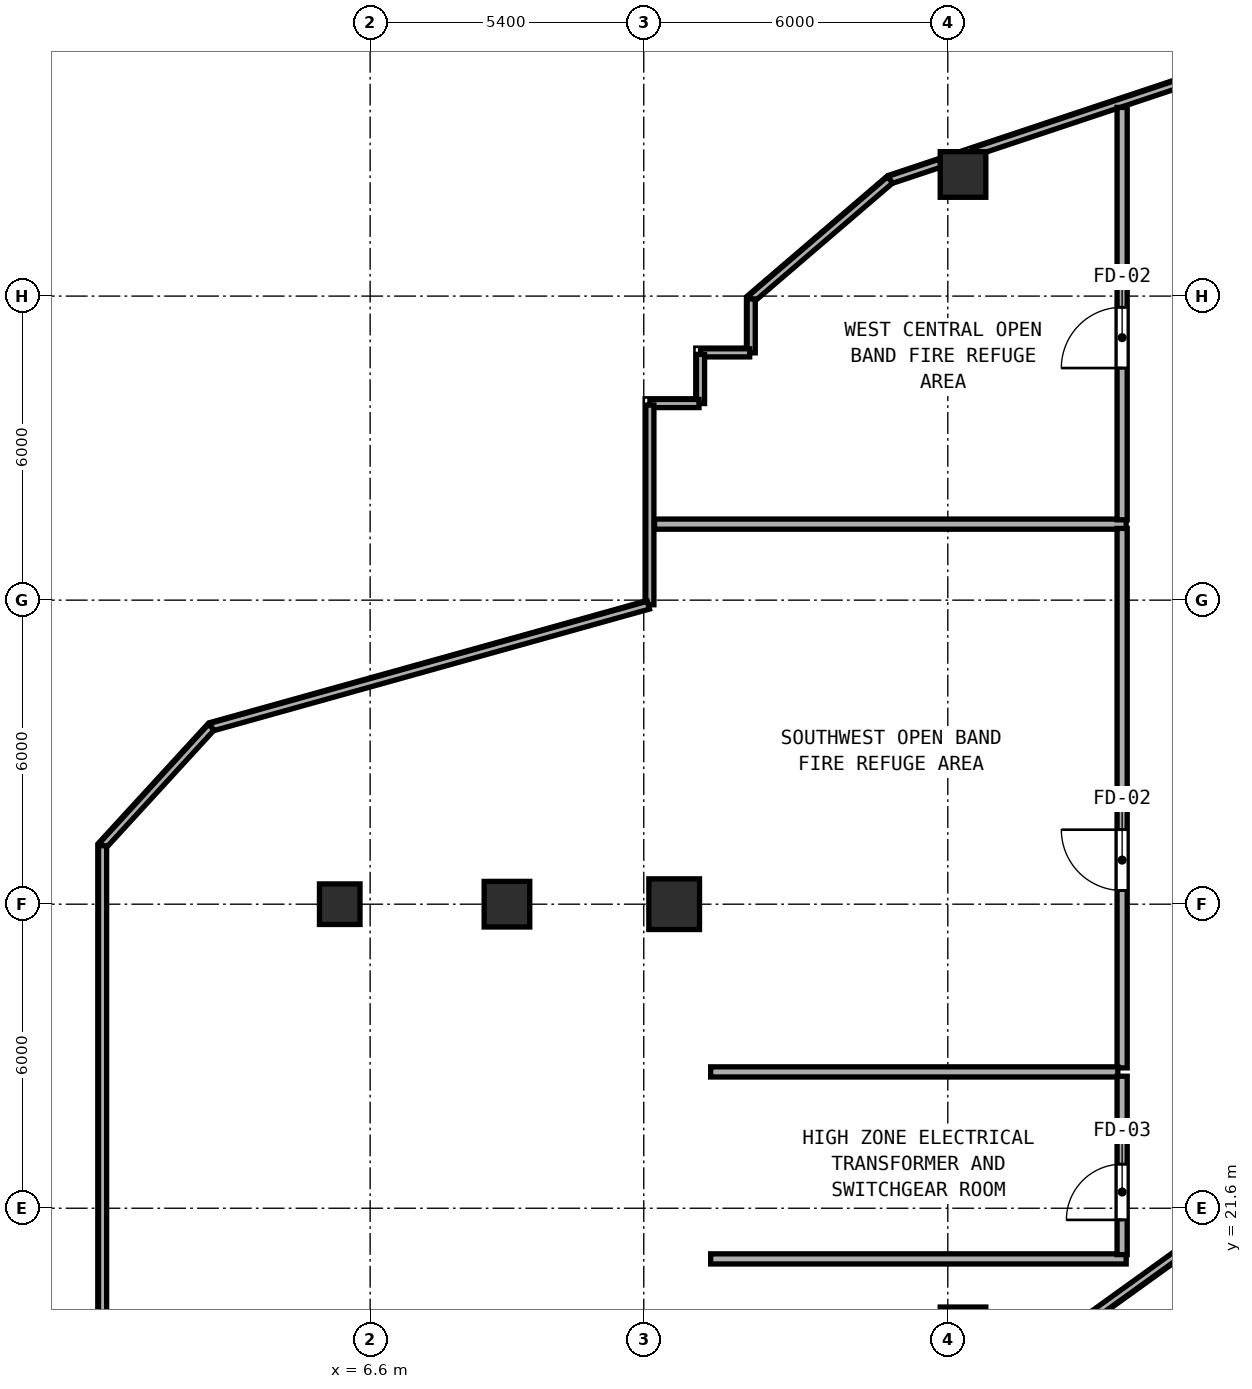
"""IFC4 building model, lengths in metres.
Left out: names, types, materials, properties, quantities, classifications, styles, units other than length and angle.
Written with IfcOpenShell. Run it as: python <this file> out.ifc"""

import sys

from ifc_helpers import new_model, si_unit, direction, frame, frame_2d, origin, origin_2d, place, context, subcontext, project, spatial, rectangle, hollow_rectangle, extrude, element, fill, save


model = new_model("IFC4")
c1 = context("Model", 3, precision=1e-05, world=origin(), true_north=direction((0.0, 1.0)))
c2 = subcontext(c1, "Body", "Model", "MODEL_VIEW")
j1 = project(units=[si_unit("LENGTHUNIT", "METRE"), si_unit("PLANEANGLEUNIT", "RADIAN")], contexts=[c1])
p1 = place(None, origin())
s1 = spatial("IfcSite", under=j1, at=p1, CompositionType="ELEMENT")
p2 = place(p1, origin())
s2 = spatial("IfcBuilding", under=s1, at=p2, CompositionType="ELEMENT")
p3 = place(p2, frame((0.0, 0.0, 160.0)))
s3 = spatial("IfcBuildingStorey", under=s2, at=p3, CompositionType="ELEMENT", Elevation=160.0)
p4 = place(p3, frame((12.6, 27.6, 0.0), z_axis=(0.0, 0.0, 1.0), x_axis=(1.0, 0.0, 0.0)))
e1 = element("IfcColumn", 1, at=p4, inside=s3, PredefinedType="COLUMN", context=c2, shape_type="SweptSolid", body=[
    extrude(hollow_rectangle(XDim=1.0, YDim=1.0, WallThickness=0.038, at=origin_2d()), origin(), (0.0, 0.0, 1.0), 4.6),
])
p5 = place(p3, frame((6.0, 27.6, 0.0), z_axis=(0.0, 0.0, 1.0), x_axis=(1.0, 0.0, 0.0)))
e2 = element("IfcColumn", 2, at=p5, inside=s3, PredefinedType="COLUMN", context=c2, shape_type="SweptSolid", body=[
    extrude(hollow_rectangle(XDim=0.8, YDim=0.8, WallThickness=0.03, at=origin_2d()), origin(), (0.0, 0.0, 1.0), 4.6),
])
for number, where, z_axis, x_axis in (
    (3, (18.3, 19.2, 0.0), (0.0, 0.0, 1.0), (1.0, 0.0, 0.0)),
    (4, (18.3, 42.0, 0.0), (0.0, 0.0, 1.0), (1.0, 0.0, 0.0)),
    (5, (9.3, 27.6, 0.0), (0.0, 0.0, 1.0), (1.0, 0.0, 0.0)),
):
    element("IfcColumn", number, at=place(p3, frame(where, z_axis=z_axis, x_axis=x_axis)), inside=s3, PredefinedType="COLUMN", context=c2, shape_type="SweptSolid", body=[
        extrude(hollow_rectangle(XDim=0.9, YDim=0.9, WallThickness=0.034, at=origin_2d()), origin(), (0.0, 0.0, 1.0), 4.6),
    ])
p6 = place(p3, frame((14.193, 14.687, 0.0), z_axis=(0.0, 0.0, 1.0), x_axis=(0.811543217016, 0.584292398475, 0.0)))
e6 = element("IfcWall", 6, at=p6, inside=s3, PredefinedType="PARAPET", context=c2, shape_type="SweptSolid", body=[
    extrude(rectangle(XDim=11.478, YDim=0.16, at=frame_2d((5.739, 0.0))), origin(), (0.0, 0.0, 1.0), 1.15),
])
p7 = place(p3, frame((24.092, 44.304, 0.0), z_axis=(0.0, 0.0, 1.0), x_axis=(-0.948683298051, -0.316227766017, 0.0)))
e7 = element("IfcWall", 7, at=p7, inside=s3, PredefinedType="PARAPET", context=c2, shape_type="SweptSolid", body=[
    extrude(rectangle(XDim=5.888, YDim=0.16, at=frame_2d((2.944, 0.0))), origin(), (0.0, 0.0, 1.0), 1.15),
])
p8 = place(p3, frame((17.858, 42.226, 0.0), z_axis=(0.0, 0.0, 1.0), x_axis=(-0.948636865667, -0.316367029093, 0.0)))
e8 = element("IfcWall", 8, at=p8, inside=s3, PredefinedType="PARAPET", context=c2, shape_type="SweptSolid", body=[
    extrude(rectangle(XDim=1.052, YDim=0.16, at=frame_2d((0.526, 0.0))), origin(), (0.0, 0.0, 1.0), 1.15),
])
p9 = place(p3, frame((16.86, 41.894, 0.0), z_axis=(0.0, 0.0, 1.0), x_axis=(-0.759247051556, -0.650802515902, 0.0)))
e9 = element("IfcWall", 9, at=p9, inside=s3, PredefinedType="PARAPET", context=c2, shape_type="SweptSolid", body=[
    extrude(rectangle(XDim=3.609, YDim=0.16, at=frame_2d((1.804, 0.0))), origin(), (0.0, 0.0, 1.0), 1.15),
])
p10 = place(p3, frame((14.12, 39.545, 0.0), z_axis=(0.0, 0.0, 1.0), x_axis=(0.0, -1.0, 0.0)))
e10 = element("IfcWall", 10, at=p10, inside=s3, PredefinedType="PARAPET", context=c2, shape_type="SweptSolid", body=[
    extrude(rectangle(XDim=1.065, YDim=0.16, at=frame_2d((0.532, 0.0))), origin(), (0.0, 0.0, 1.0), 1.15),
])
for number, where, z_axis, x_axis in (
    (11, (14.09, 38.48, 0.0), (0.0, 0.0, 1.0), (-1.0, 0.0, 0.0)),
    (12, (13.12, 38.45, 0.0), (0.0, 0.0, 1.0), (0.0, -1.0, 0.0)),
    (13, (13.09, 37.48, 0.0), (0.0, 0.0, 1.0), (-1.0, 0.0, 0.0)),
):
    element("IfcWall", number, at=place(p3, frame(where, z_axis=z_axis, x_axis=x_axis)), inside=s3, PredefinedType="PARAPET", context=c2, shape_type="SweptSolid", body=[
        extrude(rectangle(XDim=0.97, YDim=0.16, at=frame_2d((0.485, 0.0))), origin(), (0.0, 0.0, 1.0), 1.15),
    ])
p11 = place(p3, frame((12.12, 37.45, 0.0), z_axis=(0.0, 0.0, 1.0), x_axis=(0.0, -1.0, 0.0)))
e14 = element("IfcWall", 14, at=p11, inside=s3, PredefinedType="PARAPET", context=c2, shape_type="SweptSolid", body=[
    extrude(rectangle(XDim=3.941, YDim=0.16, at=frame_2d((1.971, 0.0))), origin(), (0.0, 0.0, 1.0), 1.15),
])
p12 = place(p3, frame((12.091, 33.501, 0.0), z_axis=(0.0, 0.0, 1.0), x_axis=(-0.963194988148, -0.26880367335, 0.0)))
e15 = element("IfcWall", 15, at=p12, inside=s3, PredefinedType="PARAPET", context=c2, shape_type="SweptSolid", body=[
    extrude(rectangle(XDim=8.955, YDim=0.16, at=frame_2d((4.478, 0.0))), origin(), (0.0, 0.0, 1.0), 1.15),
])
p13 = place(p3, frame((3.465, 31.094, 0.0), z_axis=(0.0, 0.0, 1.0), x_axis=(-0.675755969938, -0.737125409339, 0.0)))
e16 = element("IfcWall", 16, at=p13, inside=s3, PredefinedType="PARAPET", context=c2, shape_type="SweptSolid", body=[
    extrude(rectangle(XDim=3.175, YDim=0.16, at=frame_2d((1.587, 0.0))), origin(), (0.0, 0.0, 1.0), 1.15),
])
p14 = place(p3, frame((1.32, 28.753, 0.0), z_axis=(0.0, 0.0, 1.0), x_axis=(0.0, -1.0, 0.0)))
e17 = element("IfcWall", 17, at=p14, inside=s3, PredefinedType="PARAPET", context=c2, shape_type="SweptSolid", body=[
    extrude(rectangle(XDim=20.833, YDim=0.16, at=frame_2d((10.417, 0.0))), origin(), (0.0, 0.0, 1.0), 1.15),
])
p15 = place(p3, frame((12.212, 35.1, 0.0), z_axis=(0.0, 0.0, 1.0), x_axis=(1.0, 0.0, 0.0)))
e18 = element("IfcWall", 18, at=p15, inside=s3, PredefinedType="SOLIDWALL", context=c2, shape_type="SweptSolid", body=[
    extrude(rectangle(XDim=9.308, YDim=0.2, at=frame_2d((4.654, 0.0))), origin(), (0.0, 0.0, 1.0), 4.35),
])
p16 = place(p3, frame((21.44, 24.37, 0.0), z_axis=(0.0, 0.0, 1.0), x_axis=(0.0, 1.0, 0.0)))
e19 = element("IfcWall", 19, at=p16, inside=s3, PredefinedType="SOLIDWALL", context=c2, shape_type="SweptSolid", body=[
    extrude(rectangle(XDim=10.645, YDim=0.2, at=frame_2d((5.322, 0.0))), origin(), (0.0, 0.0, 1.0), 4.35),
])
p17 = place(p16, frame((4.7, 0.0, 0.0), z_axis=(0.0, 0.0, 1.0), x_axis=(-1.0, 0.0, 0.0)))
e20 = element("IfcOpeningElement", 20, at=p17, cuts=e19, PredefinedType="OPENING", context=c2, shape_type="SweptSolid", body=[
    extrude(rectangle(XDim=1.2, YDim=2.15, at=frame_2d((0.6, 1.075))), frame((0.0, 0.11, 0.0), z_axis=(0.0, -1.0, 0.0), x_axis=(1.0, 0.0, 0.0)), (0.0, 0.0, 1.0), 0.22),
])
p18 = place(p3, frame((21.44, 35.185, 0.0), z_axis=(0.0, 0.0, 1.0), x_axis=(0.0, 1.0, 0.0)))
e21 = element("IfcWall", 21, at=p18, inside=s3, PredefinedType="SOLIDWALL", context=c2, shape_type="SweptSolid", body=[
    extrude(rectangle(XDim=8.138, YDim=0.2, at=frame_2d((4.069, 0.0))), origin(), (0.0, 0.0, 1.0), 4.35),
])
p19 = place(p18, frame((4.195, 0.0, 0.0), z_axis=(0.0, 0.0, 1.0), x_axis=(-1.0, 0.0, 0.0)))
e22 = element("IfcOpeningElement", 22, at=p19, cuts=e21, PredefinedType="OPENING", context=c2, shape_type="SweptSolid", body=[
    extrude(rectangle(XDim=1.2, YDim=2.15, at=frame_2d((0.6, 1.075))), frame((0.0, 0.11, 0.0), z_axis=(0.0, -1.0, 0.0), x_axis=(1.0, 0.0, 0.0)), (0.0, 0.0, 1.0), 0.22),
])
p20 = place(p3, frame((13.32, 24.29, 0.0), z_axis=(0.0, 0.0, 1.0), x_axis=(1.0, 0.0, 0.0)))
e23 = element("IfcWall", 23, at=p20, inside=s3, PredefinedType="SOLIDWALL", context=c2, shape_type="SweptSolid", body=[
    extrude(rectangle(XDim=8.035, YDim=0.2, at=frame_2d((4.018, 0.0))), origin(), (0.0, 0.0, 1.0), 4.35),
])
p21 = place(p3, frame((13.32, 20.6, 0.0), z_axis=(0.0, 0.0, 1.0), x_axis=(1.0, 0.0, 0.0)))
e24 = element("IfcWall", 24, at=p21, inside=s3, PredefinedType="SOLIDWALL", context=c2, shape_type="SweptSolid", body=[
    extrude(rectangle(XDim=8.2, YDim=0.2, at=frame_2d((4.1, 0.0))), origin(), (0.0, 0.0, 1.0), 4.35),
])
p22 = place(p3, frame((21.44, 20.685, 0.0), z_axis=(0.0, 0.0, 1.0), x_axis=(0.0, 1.0, 0.0)))
e25 = element("IfcWall", 25, at=p22, inside=s3, PredefinedType="SOLIDWALL", context=c2, shape_type="SweptSolid", body=[
    extrude(rectangle(XDim=3.52, YDim=0.2, at=frame_2d((1.76, 0.0))), origin(), (0.0, 0.0, 1.0), 4.35),
])
p23 = place(p22, frame((1.785, 0.0, 0.0), z_axis=(0.0, 0.0, 1.0), x_axis=(-1.0, 0.0, 0.0)))
e26 = element("IfcOpeningElement", 26, at=p23, cuts=e25, PredefinedType="OPENING", context=c2, shape_type="SweptSolid", body=[
    extrude(rectangle(XDim=1.1, YDim=2.15, at=frame_2d((0.55, 1.075))), frame((0.0, 0.11, 0.0), z_axis=(0.0, -1.0, 0.0), x_axis=(1.0, 0.0, 0.0)), (0.0, 0.0, 1.0), 0.22),
])
p24 = place(p17, origin())
e27 = element("IfcDoor", 27, at=p24, inside=s3, OperationType="SINGLE_SWING_LEFT", PredefinedType="DOOR", context=c2, shape_type="SweptSolid", body=[
    extrude(rectangle(XDim=1.2, YDim=2.15, at=frame_2d((0.6, 1.075))), frame((0.0, 0.025, 0.0), z_axis=(0.0, -1.0, 0.0), x_axis=(1.0, 0.0, 0.0)), (0.0, 0.0, 1.0), 0.05),
])
fill(e20, e27)
p25 = place(p19, origin())
e28 = element("IfcDoor", 28, at=p25, inside=s3, OperationType="SINGLE_SWING_RIGHT", PredefinedType="DOOR", context=c2, shape_type="SweptSolid", body=[
    extrude(rectangle(XDim=1.2, YDim=2.15, at=frame_2d((0.6, 1.075))), frame((0.0, 0.025, 0.0), z_axis=(0.0, -1.0, 0.0), x_axis=(1.0, 0.0, 0.0)), (0.0, 0.0, 1.0), 0.05),
])
fill(e22, e28)
p26 = place(p23, origin())
e29 = element("IfcDoor", 29, at=p26, inside=s3, OperationType="SINGLE_SWING_RIGHT", PredefinedType="DOOR", context=c2, shape_type="SweptSolid", body=[
    extrude(rectangle(XDim=1.1, YDim=2.15, at=frame_2d((0.55, 1.075))), frame((0.0, 0.025, 0.0), z_axis=(0.0, -1.0, 0.0), x_axis=(1.0, 0.0, 0.0)), (0.0, 0.0, 1.0), 0.05),
])
fill(e26, e29)
save(model, sys.argv[1])
